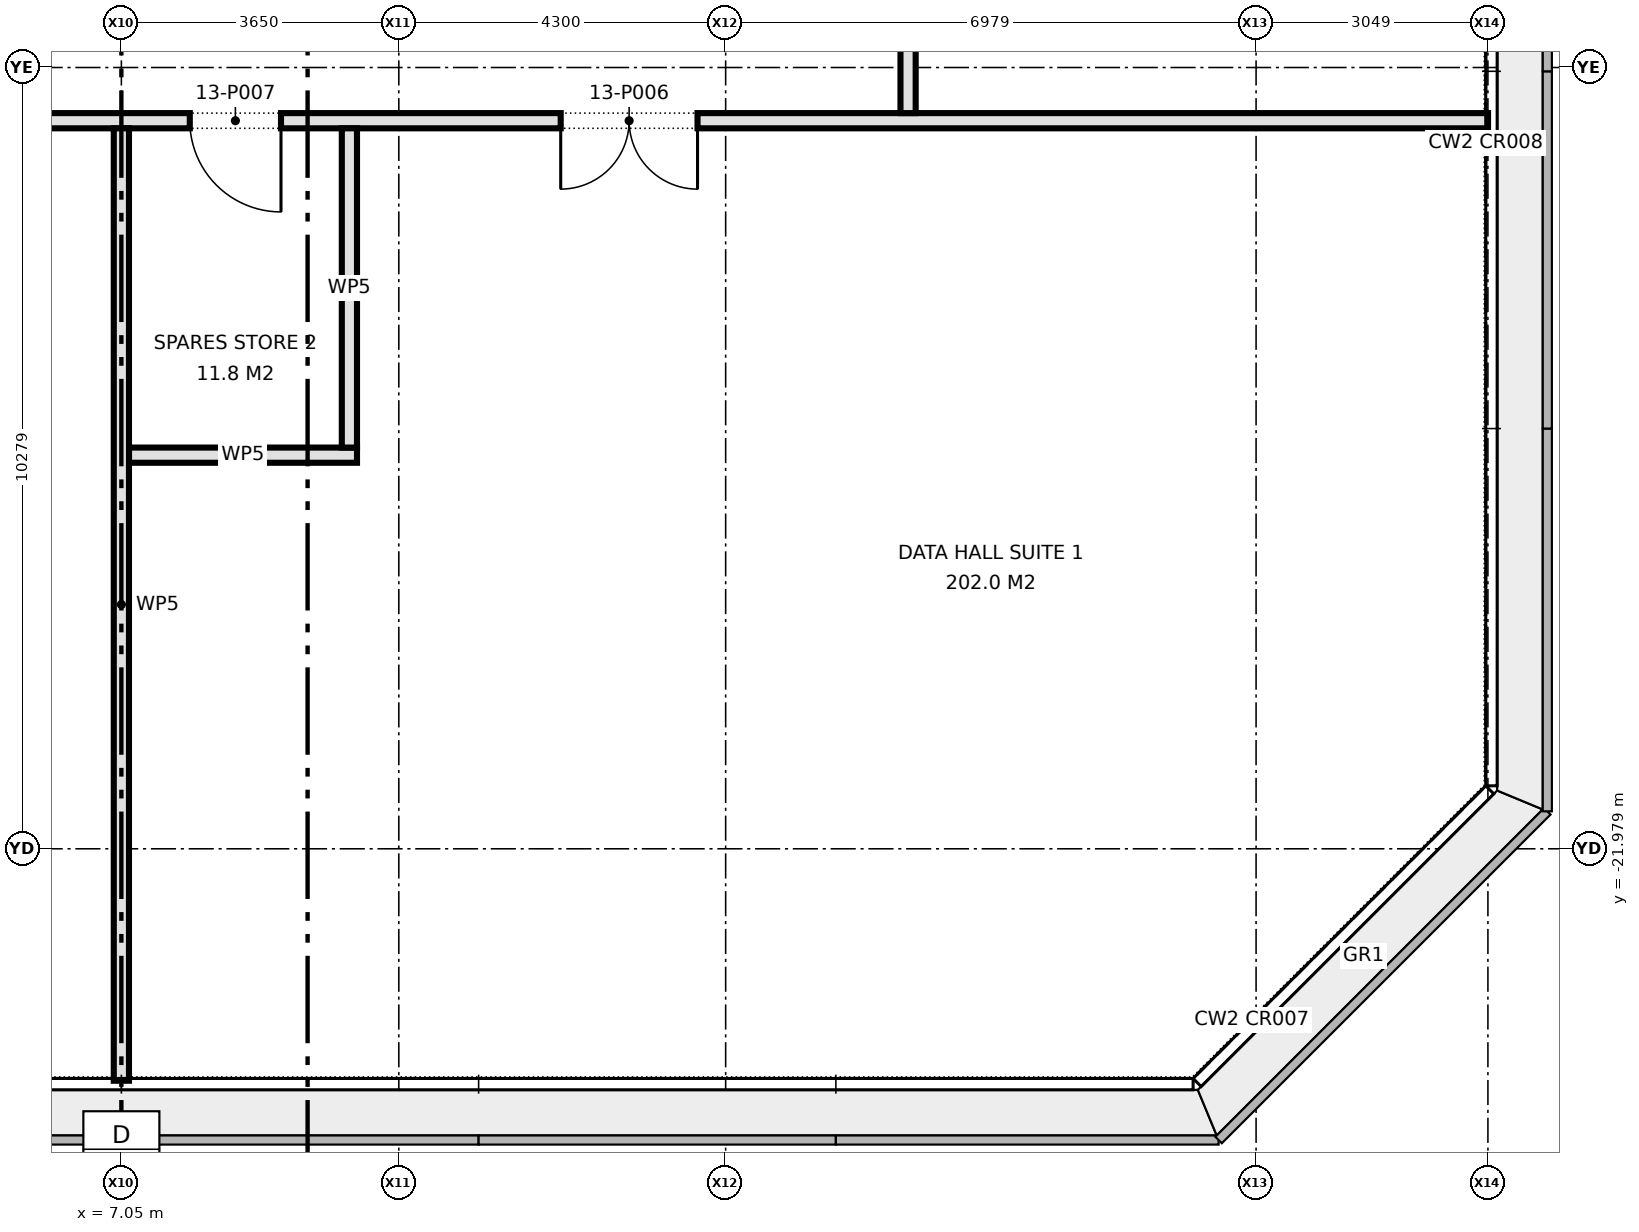
"""IFC4 building model, lengths in metres.
Left out: names, types, materials, properties, quantities, classifications, styles, units other than length and angle.
Written with IfcOpenShell. Run it as: python <this file> out.ifc"""

import sys

from ifc_helpers import new_model, si_unit, direction, frame, frame_2d, origin, place, context, subcontext, project, spatial, rectangle, extrude, element, fill, save


model = new_model("IFC4")
c1 = context("Model", 3, precision=1e-05, world=origin(), true_north=direction((0.0, 1.0)))
c2 = subcontext(c1, "Body", "Model", "MODEL_VIEW")
j1 = project(units=[si_unit("LENGTHUNIT", "METRE"), si_unit("PLANEANGLEUNIT", "RADIAN")], contexts=[c1])
p1 = place(None, origin())
s1 = spatial("IfcSite", under=j1, at=p1, CompositionType="ELEMENT")
p2 = place(p1, origin())
s2 = spatial("IfcBuilding", under=s1, at=p2, CompositionType="ELEMENT")
p3 = place(p2, frame((0.0, 0.0, 59.3)))
s3 = spatial("IfcBuildingStorey", under=s2, at=p3, CompositionType="ELEMENT", Elevation=59.3)
p4 = place(p3, frame((7.15, -16.8, 0.0), z_axis=(0.0, 0.0, 1.0), x_axis=(1.0, 0.0, 0.0)))
e1 = element("IfcWall", 1, at=p4, inside=s3, PredefinedType="PARTITIONING", context=c2, shape_type="SweptSolid", body=[
    extrude(rectangle(XDim=3.0, YDim=0.2, at=frame_2d((1.5, 0.0))), origin(), (0.0, 0.0, 1.0), 4.55),
])
p5 = place(p3, frame((-25.03, -12.4, 0.0), z_axis=(0.0, 0.0, 1.0), x_axis=(1.0, 0.0, 0.0)))
e2 = element("IfcWall", 2, at=p5, inside=s3, PredefinedType="PARTITIONING", context=c2, shape_type="SweptSolid", body=[
    extrude(rectangle(XDim=50.06, YDim=0.2, at=frame_2d((25.03, 0.0))), origin(), (0.0, 0.0, 1.0), 4.55),
])
p6 = place(p5, frame((18.95, 0.0, 0.0)))
e3 = element("IfcOpeningElement", 3, at=p6, cuts=e2, PredefinedType="OPENING", context=c2, shape_type="SweptSolid", body=[
    extrude(rectangle(XDim=1.8, YDim=2.1, at=frame_2d((0.9, 1.05))), frame((0.0, 0.11, 0.0), z_axis=(0.0, -1.0, 0.0), x_axis=(1.0, 0.0, 0.0)), (0.0, 0.0, 1.0), 0.22),
])
p7 = place(p5, frame((37.86, 0.0, 0.0)))
e4 = element("IfcOpeningElement", 4, at=p7, cuts=e2, PredefinedType="OPENING", context=c2, shape_type="SweptSolid", body=[
    extrude(rectangle(XDim=1.8, YDim=2.1, at=frame_2d((0.9, 1.05))), frame((0.0, 0.11, 0.0), z_axis=(0.0, -1.0, 0.0), x_axis=(1.0, 0.0, 0.0)), (0.0, 0.0, 1.0), 0.22),
])
p8 = place(p5, frame((32.98, 0.0, 0.0)))
e5 = element("IfcOpeningElement", 5, at=p8, cuts=e2, PredefinedType="OPENING", context=c2, shape_type="SweptSolid", body=[
    extrude(rectangle(XDim=1.2, YDim=2.1, at=frame_2d((0.6, 1.05))), frame((0.0, 0.11, 0.0), z_axis=(0.0, -1.0, 0.0), x_axis=(1.0, 0.0, 0.0)), (0.0, 0.0, 1.0), 0.22),
])
p9 = place(p3, frame((17.4, -12.3, 0.0), z_axis=(0.0, 0.0, 1.0), x_axis=(0.0, 1.0, 0.0)))
e6 = element("IfcWall", 6, at=p9, inside=s3, PredefinedType="PARTITIONING", context=c2, shape_type="SweptSolid", body=[
    extrude(rectangle(XDim=24.6, YDim=0.2, at=frame_2d((12.3, 0.0))), origin(), (0.0, 0.0, 1.0), 4.55),
])
p10 = place(p9, frame((4.025, 0.0, 0.0)))
e7 = element("IfcOpeningElement", 7, at=p10, cuts=e6, PredefinedType="OPENING", context=c2, shape_type="SweptSolid", body=[
    extrude(rectangle(XDim=1.8, YDim=2.1, at=frame_2d((0.9, 1.05))), frame((0.0, 0.11, 0.0), z_axis=(0.0, -1.0, 0.0), x_axis=(1.0, 0.0, 0.0)), (0.0, 0.0, 1.0), 0.22),
])
p11 = place(p9, frame((14.05, 0.0, 0.0)))
e8 = element("IfcOpeningElement", 8, at=p11, cuts=e6, PredefinedType="OPENING", context=c2, shape_type="SweptSolid", body=[
    extrude(rectangle(XDim=1.2, YDim=2.1, at=frame_2d((0.6, 1.05))), frame((0.0, 0.11, 0.0), z_axis=(0.0, -1.0, 0.0), x_axis=(1.0, 0.0, 0.0)), (0.0, 0.0, 1.0), 0.22),
])
p12 = place(p9, frame((21.125, 0.0, 0.0)))
e9 = element("IfcOpeningElement", 9, at=p12, cuts=e6, PredefinedType="OPENING", context=c2, shape_type="SweptSolid", body=[
    extrude(rectangle(XDim=1.8, YDim=2.1, at=frame_2d((0.9, 1.05))), frame((0.0, 0.11, 0.0), z_axis=(0.0, -1.0, 0.0), x_axis=(1.0, 0.0, 0.0)), (0.0, 0.0, 1.0), 0.22),
])
p13 = place(p3, frame((10.05, -16.7, 0.0), z_axis=(0.0, 0.0, 1.0), x_axis=(0.0, 1.0, 0.0)))
e10 = element("IfcWall", 10, at=p13, inside=s3, PredefinedType="PARTITIONING", context=c2, shape_type="SweptSolid", body=[
    extrude(rectangle(XDim=4.2, YDim=0.2, at=frame_2d((2.1, 0.0))), origin(), (0.0, 0.0, 1.0), 4.55),
])
p14 = place(p3, frame((7.05, -25.03, 0.0), z_axis=(0.0, 0.0, 1.0), x_axis=(0.0, 1.0, 0.0)))
e11 = element("IfcWall", 11, at=p14, inside=s3, PredefinedType="PARTITIONING", context=c2, shape_type="SweptSolid", body=[
    extrude(rectangle(XDim=12.53, YDim=0.2, at=frame_2d((6.265, 0.0))), origin(), (0.0, 0.0, 1.0), 4.55),
])
p15 = place(p7, frame((1.8, 0.0, 0.0), z_axis=(0.0, 0.0, 1.0), x_axis=(-1.0, 0.0, 0.0)))
e12 = element("IfcDoor", 12, at=p15, inside=s3, OperationType="DOUBLE_DOOR_SINGLE_SWING", PredefinedType="DOOR", context=c2, shape_type="SweptSolid", body=[
    extrude(rectangle(XDim=1.8, YDim=2.1, at=frame_2d((0.9, 1.05))), frame((0.0, 0.025, 0.0), z_axis=(0.0, -1.0, 0.0), x_axis=(1.0, 0.0, 0.0)), (0.0, 0.0, 1.0), 0.05),
])
fill(e4, e12)
p16 = place(p8, frame((1.2, 0.0, 0.0), z_axis=(0.0, 0.0, 1.0), x_axis=(-1.0, 0.0, 0.0)))
e13 = element("IfcDoor", 13, at=p16, inside=s3, OperationType="SINGLE_SWING_LEFT", PredefinedType="DOOR", context=c2, shape_type="SweptSolid", body=[
    extrude(rectangle(XDim=1.2, YDim=2.1, at=frame_2d((0.6, 1.05))), frame((0.0, 0.025, 0.0), z_axis=(0.0, -1.0, 0.0), x_axis=(1.0, 0.0, 0.0)), (0.0, 0.0, 1.0), 0.05),
])
fill(e5, e13)
save(model, sys.argv[1])
